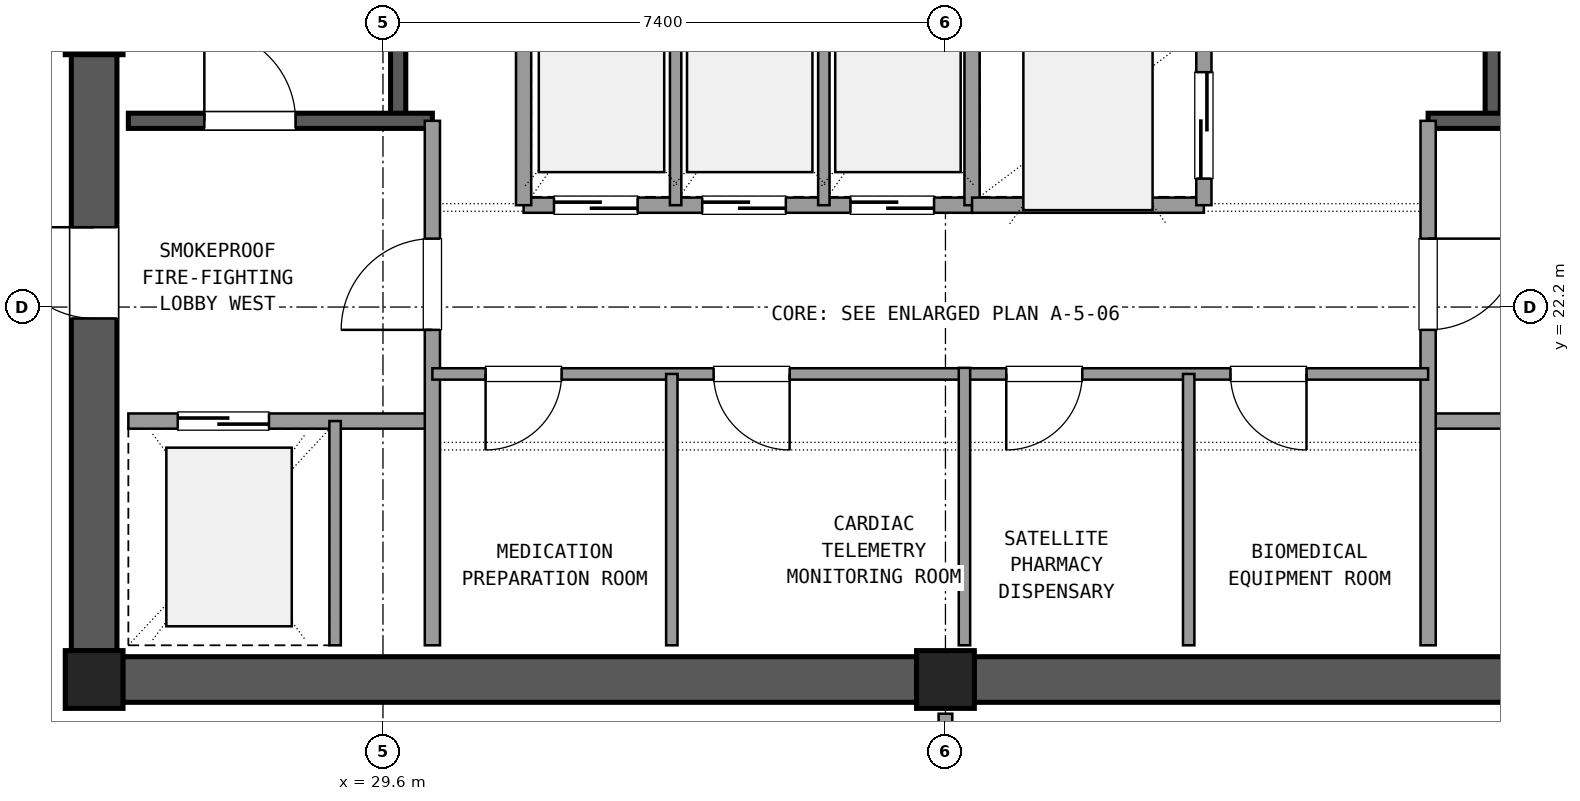
"""IFC4 building model, lengths in metres.
Left out: names, types, materials, properties, quantities, classifications, styles, units other than length and angle.
Written with IfcOpenShell. Run it as: python <this file> out.ifc"""

import sys

from ifc_helpers import new_model, si_unit, direction, frame, frame_2d, origin, origin_2d, place, context, subcontext, project, spatial, rectangle, extrude, element, fill, save


model = new_model("IFC4")
c1 = context("Model", 3, precision=1e-05, world=origin(), true_north=direction((0.0, 1.0)))
c2 = subcontext(c1, "Body", "Model", "MODEL_VIEW")
j1 = project(units=[si_unit("LENGTHUNIT", "METRE"), si_unit("PLANEANGLEUNIT", "RADIAN")], contexts=[c1])
p1 = place(None, origin())
s1 = spatial("IfcSite", under=j1, at=p1, CompositionType="ELEMENT")
p2 = place(p1, origin())
s2 = spatial("IfcBuilding", under=s1, at=p2, CompositionType="ELEMENT")
p3 = place(p2, frame((0.0, 0.0, 268.02)))
s3 = spatial("IfcBuildingStorey", under=s2, at=p3, CompositionType="ELEMENT", Elevation=268.02)
for number, where, z_axis, x_axis in (
    (1, (25.8, 17.3, 0.0), (0.0, 0.0, 1.0), (1.0, 0.0, 0.0)),
    (2, (37.0, 17.3, 0.0), (0.0, 0.0, 1.0), (1.0, 0.0, 0.0)),
    (3, (25.8, 25.9, 0.0), (0.0, 0.0, 1.0), (1.0, 0.0, 0.0)),
):
    element("IfcColumn", number, at=place(p3, frame(where, z_axis=z_axis, x_axis=x_axis)), inside=s3, PredefinedType="COLUMN", context=c2, shape_type="SweptSolid", body=[
        extrude(rectangle(XDim=0.76, YDim=0.76, at=origin_2d()), origin(), (0.0, 0.0, 1.0), 3.6),
    ])
for number, where, z_axis, x_axis in (
    (4, (26.175, 17.3, 0.0), (0.0, 0.0, 1.0), (1.0, 0.0, 0.0)),
    (5, (37.375, 17.3, 0.0), (0.0, 0.0, 1.0), (1.0, 0.0, 0.0)),
):
    element("IfcWall", number, at=place(p3, frame(where, z_axis=z_axis, x_axis=x_axis)), inside=s3, PredefinedType="SHEAR", context=c2, shape_type="SweptSolid", body=[
        extrude(rectangle(XDim=10.45, YDim=0.6, at=frame_2d((5.225, 0.0))), origin(), (0.0, 0.0, 1.0), 3.32),
    ])
p4 = place(p3, frame((25.8, 25.525, 0.0), z_axis=(0.0, 0.0, 1.0), x_axis=(0.0, -1.0, 0.0)))
e6 = element("IfcWall", 6, at=p4, inside=s3, PredefinedType="SHEAR", context=c2, shape_type="SweptSolid", body=[
    extrude(rectangle(XDim=7.85, YDim=0.6, at=frame_2d((3.925, 0.0))), origin(), (0.0, 0.0, 1.0), 3.32),
])
p5 = place(p4, frame((2.275, 0.0, 0.0)))
e7 = element("IfcOpeningElement", 7, at=p5, cuts=e6, PredefinedType="OPENING", context=c2, shape_type="SweptSolid", body=[
    extrude(rectangle(XDim=1.2, YDim=2.15, at=frame_2d((0.6, 1.075))), frame((0.0, 0.31, 0.0), z_axis=(0.0, -1.0, 0.0), x_axis=(1.0, 0.0, 0.0)), (0.0, 0.0, 1.0), 0.62),
])
p6 = place(p3, frame((29.8, 24.65, 0.0), z_axis=(0.0, 0.0, 1.0), x_axis=(0.0, 1.0, 0.0)))
e8 = element("IfcWall", 8, at=p6, inside=s3, PredefinedType="SHEAR", context=c2, shape_type="SweptSolid", body=[
    extrude(rectangle(XDim=9.4, YDim=0.2, at=frame_2d((4.7, 0.0))), origin(), (0.0, 0.0, 1.0), 3.32),
])
p7 = place(p3, frame((26.25, 24.65, 0.0), z_axis=(0.0, 0.0, 1.0), x_axis=(1.0, 0.0, 0.0)))
e9 = element("IfcWall", 9, at=p7, inside=s3, PredefinedType="SHEAR", context=c2, shape_type="SweptSolid", body=[
    extrude(rectangle(XDim=4.0, YDim=0.2, at=frame_2d((2.0, 0.0))), origin(), (0.0, 0.0, 1.0), 3.32),
])
p8 = place(p7, frame((1.0, 0.0, 0.0)))
e10 = element("IfcOpeningElement", 10, at=p8, cuts=e9, PredefinedType="OPENING", context=c2, shape_type="SweptSolid", body=[
    extrude(rectangle(XDim=1.2, YDim=2.15, at=frame_2d((0.6, 1.075))), frame((0.0, 0.11, 0.0), z_axis=(0.0, -1.0, 0.0), x_axis=(1.0, 0.0, 0.0)), (0.0, 0.0, 1.0), 0.22),
])
p9 = place(p3, frame((44.2, 24.65, 0.0), z_axis=(0.0, 0.0, 1.0), x_axis=(0.0, 1.0, 0.0)))
e11 = element("IfcWall", 11, at=p9, inside=s3, PredefinedType="SHEAR", context=c2, shape_type="SweptSolid", body=[
    extrude(rectangle(XDim=9.4, YDim=0.2, at=frame_2d((4.7, 0.0))), origin(), (0.0, 0.0, 1.0), 3.32),
])
p10 = place(p3, frame((43.35, 24.65, 0.0), z_axis=(0.0, 0.0, 1.0), x_axis=(1.0, 0.0, 0.0)))
e12 = element("IfcWall", 12, at=p10, inside=s3, PredefinedType="SHEAR", context=c2, shape_type="SweptSolid", body=[
    extrude(rectangle(XDim=4.4, YDim=0.2, at=frame_2d((2.2, 0.0))), origin(), (0.0, 0.0, 1.0), 3.32),
])
p11 = place(p10, frame((2.0, 0.0, 0.0)))
e13 = element("IfcOpeningElement", 13, at=p11, cuts=e12, PredefinedType="OPENING", context=c2, shape_type="SweptSolid", body=[
    extrude(rectangle(XDim=1.2, YDim=2.15, at=frame_2d((0.6, 1.075))), frame((0.0, 0.11, 0.0), z_axis=(0.0, -1.0, 0.0), x_axis=(1.0, 0.0, 0.0)), (0.0, 0.0, 1.0), 0.22),
])
p12 = place(p3, frame((26.25, 20.7, 0.0), z_axis=(0.0, 0.0, 1.0), x_axis=(1.0, 0.0, 0.0)))
e14 = element("IfcWall", 14, at=p12, inside=s3, PredefinedType="SOLIDWALL", context=c2, shape_type="SweptSolid", body=[
    extrude(rectangle(XDim=4.0, YDim=0.2, at=frame_2d((2.0, 0.0))), origin(), (0.0, 0.0, 1.0), 2.61),
])
p13 = place(p12, frame((0.65, 0.0, 0.0)))
e15 = element("IfcOpeningElement", 15, at=p13, cuts=e14, PredefinedType="OPENING", context=c2, shape_type="SweptSolid", body=[
    extrude(rectangle(XDim=1.2, YDim=2.15, at=frame_2d((0.6, 1.075))), frame((0.0, 0.11, 0.0), z_axis=(0.0, -1.0, 0.0), x_axis=(1.0, 0.0, 0.0)), (0.0, 0.0, 1.0), 0.22),
])
p14 = place(p3, frame((30.25, 17.75, 0.0), z_axis=(0.0, 0.0, 1.0), x_axis=(0.0, 1.0, 0.0)))
e16 = element("IfcWall", 16, at=p14, inside=s3, PredefinedType="SOLIDWALL", context=c2, shape_type="SweptSolid", body=[
    extrude(rectangle(XDim=6.9, YDim=0.2, at=frame_2d((3.45, 0.0))), origin(), (0.0, 0.0, 1.0), 2.61),
])
p15 = place(p14, frame((4.15, 0.0, 0.0)))
e17 = element("IfcOpeningElement", 17, at=p15, cuts=e16, PredefinedType="OPENING", context=c2, shape_type="SweptSolid", body=[
    extrude(rectangle(XDim=1.2, YDim=2.15, at=frame_2d((0.6, 1.075))), frame((0.0, 0.11, 0.0), z_axis=(0.0, -1.0, 0.0), x_axis=(1.0, 0.0, 0.0)), (0.0, 0.0, 1.0), 0.22),
])
p16 = place(p3, frame((28.97, 17.75, 0.0), z_axis=(0.0, 0.0, 1.0), x_axis=(0.0, 1.0, 0.0)))
e18 = element("IfcWall", 18, at=p16, inside=s3, PredefinedType="PARTITIONING", context=c2, shape_type="SweptSolid", body=[
    extrude(rectangle(XDim=2.95, YDim=0.15, at=frame_2d((1.475, 0.0))), origin(), (0.0, 0.0, 1.0), 2.61),
])
p17 = place(p3, frame((43.35, 20.7, 0.0), z_axis=(0.0, 0.0, 1.0), x_axis=(1.0, 0.0, 0.0)))
e19 = element("IfcWall", 19, at=p17, inside=s3, PredefinedType="SOLIDWALL", context=c2, shape_type="SweptSolid", body=[
    extrude(rectangle(XDim=4.4, YDim=0.2, at=frame_2d((2.2, 0.0))), origin(), (0.0, 0.0, 1.0), 2.61),
])
p18 = place(p17, frame((2.35, 0.0, 0.0)))
e20 = element("IfcOpeningElement", 20, at=p18, cuts=e19, PredefinedType="OPENING", context=c2, shape_type="SweptSolid", body=[
    extrude(rectangle(XDim=1.2, YDim=2.15, at=frame_2d((0.6, 1.075))), frame((0.0, 0.11, 0.0), z_axis=(0.0, -1.0, 0.0), x_axis=(1.0, 0.0, 0.0)), (0.0, 0.0, 1.0), 0.22),
])
p19 = place(p3, frame((43.35, 17.75, 0.0), z_axis=(0.0, 0.0, 1.0), x_axis=(0.0, 1.0, 0.0)))
e21 = element("IfcWall", 21, at=p19, inside=s3, PredefinedType="SOLIDWALL", context=c2, shape_type="SweptSolid", body=[
    extrude(rectangle(XDim=6.9, YDim=0.2, at=frame_2d((3.45, 0.0))), origin(), (0.0, 0.0, 1.0), 2.61),
])
p20 = place(p19, frame((4.15, 0.0, 0.0)))
e22 = element("IfcOpeningElement", 22, at=p20, cuts=e21, PredefinedType="OPENING", context=c2, shape_type="SweptSolid", body=[
    extrude(rectangle(XDim=1.2, YDim=2.15, at=frame_2d((0.6, 1.075))), frame((0.0, 0.11, 0.0), z_axis=(0.0, -1.0, 0.0), x_axis=(1.0, 0.0, 0.0)), (0.0, 0.0, 1.0), 0.22),
])
p21 = place(p3, frame((30.25, 21.32, 0.0), z_axis=(0.0, 0.0, 1.0), x_axis=(1.0, 0.0, 0.0)))
e23 = element("IfcWall", 23, at=p21, inside=s3, PredefinedType="PARTITIONING", context=c2, shape_type="SweptSolid", body=[
    extrude(rectangle(XDim=7.0, YDim=0.15, at=frame_2d((3.5, 0.0))), origin(), (0.0, 0.0, 1.0), 2.61),
])
p22 = place(p21, frame((0.7, 0.0, 0.0)))
e24 = element("IfcOpeningElement", 24, at=p22, cuts=e23, PredefinedType="OPENING", context=c2, shape_type="SweptSolid", body=[
    extrude(rectangle(XDim=1.0, YDim=2.15, at=frame_2d((0.5, 1.075))), frame((0.0, 0.085, 0.0), z_axis=(0.0, -1.0, 0.0), x_axis=(1.0, 0.0, 0.0)), (0.0, 0.0, 1.0), 0.17),
])
p23 = place(p21, frame((3.7, 0.0, 0.0)))
e25 = element("IfcOpeningElement", 25, at=p23, cuts=e23, PredefinedType="OPENING", context=c2, shape_type="SweptSolid", body=[
    extrude(rectangle(XDim=1.0, YDim=2.15, at=frame_2d((0.5, 1.075))), frame((0.0, 0.085, 0.0), z_axis=(0.0, -1.0, 0.0), x_axis=(1.0, 0.0, 0.0)), (0.0, 0.0, 1.0), 0.17),
])
p24 = place(p3, frame((33.4, 17.75, 0.0), z_axis=(0.0, 0.0, 1.0), x_axis=(0.0, 1.0, 0.0)))
e26 = element("IfcWall", 26, at=p24, inside=s3, PredefinedType="PARTITIONING", context=c2, shape_type="SweptSolid", body=[
    extrude(rectangle(XDim=3.57, YDim=0.15, at=frame_2d((1.785, 0.0))), origin(), (0.0, 0.0, 1.0), 2.61),
])
p25 = place(p3, frame((37.25, 21.32, 0.0), z_axis=(0.0, 0.0, 1.0), x_axis=(1.0, 0.0, 0.0)))
e27 = element("IfcWall", 27, at=p25, inside=s3, PredefinedType="PARTITIONING", context=c2, shape_type="SweptSolid", body=[
    extrude(rectangle(XDim=6.1, YDim=0.15, at=frame_2d((3.05, 0.0))), origin(), (0.0, 0.0, 1.0), 2.61),
])
p26 = place(p25, frame((0.55, 0.0, 0.0)))
e28 = element("IfcOpeningElement", 28, at=p26, cuts=e27, PredefinedType="OPENING", context=c2, shape_type="SweptSolid", body=[
    extrude(rectangle(XDim=1.0, YDim=2.15, at=frame_2d((0.5, 1.075))), frame((0.0, 0.085, 0.0), z_axis=(0.0, -1.0, 0.0), x_axis=(1.0, 0.0, 0.0)), (0.0, 0.0, 1.0), 0.17),
])
p27 = place(p25, frame((3.5, 0.0, 0.0)))
e29 = element("IfcOpeningElement", 29, at=p27, cuts=e27, PredefinedType="OPENING", context=c2, shape_type="SweptSolid", body=[
    extrude(rectangle(XDim=1.0, YDim=2.15, at=frame_2d((0.5, 1.075))), frame((0.0, 0.085, 0.0), z_axis=(0.0, -1.0, 0.0), x_axis=(1.0, 0.0, 0.0)), (0.0, 0.0, 1.0), 0.17),
])
p28 = place(p3, frame((40.2, 17.75, 0.0), z_axis=(0.0, 0.0, 1.0), x_axis=(0.0, 1.0, 0.0)))
e30 = element("IfcWall", 30, at=p28, inside=s3, PredefinedType="PARTITIONING", context=c2, shape_type="SweptSolid", body=[
    extrude(rectangle(XDim=3.57, YDim=0.15, at=frame_2d((1.785, 0.0))), origin(), (0.0, 0.0, 1.0), 2.61),
])
p29 = place(p3, frame((37.25, 17.75, 0.0), z_axis=(0.0, 0.0, 1.0), x_axis=(0.0, 1.0, 0.0)))
e31 = element("IfcWall", 31, at=p29, inside=s3, PredefinedType="PARTITIONING", context=c2, shape_type="SweptSolid", body=[
    extrude(rectangle(XDim=3.65, YDim=0.15, at=frame_2d((1.825, 0.0))), origin(), (0.0, 0.0, 1.0), 2.61),
])
p30 = place(p3, frame((31.45, 23.54, 0.0), z_axis=(0.0, 0.0, 1.0), x_axis=(1.0, 0.0, 0.0)))
e32 = element("IfcWall", 32, at=p30, inside=s3, PredefinedType="SOLIDWALL", context=c2, shape_type="SweptSolid", body=[
    extrude(rectangle(XDim=5.9, YDim=0.2, at=frame_2d((2.95, 0.0))), origin(), (0.0, 0.0, 1.0), 2.61),
])
p31 = place(p30, frame((0.4, 0.0, 0.0)))
e33 = element("IfcOpeningElement", 33, at=p31, cuts=e32, PredefinedType="OPENING", context=c2, shape_type="SweptSolid", body=[
    extrude(rectangle(XDim=1.1, YDim=2.15, at=frame_2d((0.55, 1.075))), frame((0.0, 0.11, 0.0), z_axis=(0.0, -1.0, 0.0), x_axis=(1.0, 0.0, 0.0)), (0.0, 0.0, 1.0), 0.22),
])
p32 = place(p30, frame((2.35, 0.0, 0.0)))
e34 = element("IfcOpeningElement", 34, at=p32, cuts=e32, PredefinedType="OPENING", context=c2, shape_type="SweptSolid", body=[
    extrude(rectangle(XDim=1.1, YDim=2.15, at=frame_2d((0.55, 1.075))), frame((0.0, 0.11, 0.0), z_axis=(0.0, -1.0, 0.0), x_axis=(1.0, 0.0, 0.0)), (0.0, 0.0, 1.0), 0.22),
])
p33 = place(p30, frame((4.3, 0.0, 0.0)))
e35 = element("IfcOpeningElement", 35, at=p33, cuts=e32, PredefinedType="OPENING", context=c2, shape_type="SweptSolid", body=[
    extrude(rectangle(XDim=1.1, YDim=2.15, at=frame_2d((0.55, 1.075))), frame((0.0, 0.11, 0.0), z_axis=(0.0, -1.0, 0.0), x_axis=(1.0, 0.0, 0.0)), (0.0, 0.0, 1.0), 0.22),
])
p34 = place(p3, frame((31.45, 23.54, 0.0), z_axis=(0.0, 0.0, 1.0), x_axis=(0.0, 1.0, 0.0)))
e36 = element("IfcWall", 36, at=p34, inside=s3, PredefinedType="SOLIDWALL", context=c2, shape_type="SweptSolid", body=[
    extrude(rectangle(XDim=2.81, YDim=0.2, at=frame_2d((1.405, 0.0))), origin(), (0.0, 0.0, 1.0), 2.61),
])
for number, where, z_axis, x_axis in (
    (37, (33.45, 23.54, 0.0), (0.0, 0.0, 1.0), (0.0, 1.0, 0.0)),
    (38, (35.4, 23.54, 0.0), (0.0, 0.0, 1.0), (0.0, 1.0, 0.0)),
):
    element("IfcWall", number, at=place(p3, frame(where, z_axis=z_axis, x_axis=x_axis)), inside=s3, PredefinedType="PARTITIONING", context=c2, shape_type="SweptSolid", body=[
        extrude(rectangle(XDim=2.81, YDim=0.15, at=frame_2d((1.405, 0.0))), origin(), (0.0, 0.0, 1.0), 2.61),
    ])
p35 = place(p3, frame((37.35, 23.54, 0.0), z_axis=(0.0, 0.0, 1.0), x_axis=(0.0, 1.0, 0.0)))
e39 = element("IfcWall", 39, at=p35, inside=s3, PredefinedType="SOLIDWALL", context=c2, shape_type="SweptSolid", body=[
    extrude(rectangle(XDim=6.82, YDim=0.2, at=frame_2d((3.41, 0.0))), origin(), (0.0, 0.0, 1.0), 2.61),
])
p36 = place(p3, frame((37.35, 23.54, 0.0), z_axis=(0.0, 0.0, 1.0), x_axis=(1.0, 0.0, 0.0)))
e40 = element("IfcWall", 40, at=p36, inside=s3, PredefinedType="SOLIDWALL", context=c2, shape_type="SweptSolid", body=[
    extrude(rectangle(XDim=3.05, YDim=0.2, at=frame_2d((1.525, 0.0))), origin(), (0.0, 0.0, 1.0), 2.61),
])
p37 = place(p3, frame((40.4, 23.54, 0.0), z_axis=(0.0, 0.0, 1.0), x_axis=(0.0, 1.0, 0.0)))
e41 = element("IfcWall", 41, at=p37, inside=s3, PredefinedType="SOLIDWALL", context=c2, shape_type="SweptSolid", body=[
    extrude(rectangle(XDim=6.82, YDim=0.2, at=frame_2d((3.41, 0.0))), origin(), (0.0, 0.0, 1.0), 2.61),
])
p38 = place(p37, frame((0.35, 0.0, 0.0)))
e42 = element("IfcOpeningElement", 42, at=p38, cuts=e41, PredefinedType="OPENING", context=c2, shape_type="SweptSolid", body=[
    extrude(rectangle(XDim=1.4, YDim=2.2, at=frame_2d((0.7, 1.1))), frame((0.0, 0.11, 0.0), z_axis=(0.0, -1.0, 0.0), x_axis=(1.0, 0.0, 0.0)), (0.0, 0.0, 1.0), 0.22),
])
p39 = place(p37, frame((2.65, 0.0, 0.0)))
e43 = element("IfcOpeningElement", 43, at=p39, cuts=e41, PredefinedType="OPENING", context=c2, shape_type="SweptSolid", body=[
    extrude(rectangle(XDim=1.4, YDim=2.2, at=frame_2d((0.7, 1.1))), frame((0.0, 0.11, 0.0), z_axis=(0.0, -1.0, 0.0), x_axis=(1.0, 0.0, 0.0)), (0.0, 0.0, 1.0), 0.22),
])
p40 = place(p37, frame((4.85, 0.0, 0.0)))
e44 = element("IfcOpeningElement", 44, at=p40, cuts=e41, PredefinedType="OPENING", context=c2, shape_type="SweptSolid", body=[
    extrude(rectangle(XDim=1.4, YDim=2.2, at=frame_2d((0.7, 1.1))), frame((0.0, 0.11, 0.0), z_axis=(0.0, -1.0, 0.0), x_axis=(1.0, 0.0, 0.0)), (0.0, 0.0, 1.0), 0.22),
])
p41 = place(p3, frame((37.0, 14.15, 0.0), z_axis=(0.0, 0.0, 1.0), x_axis=(0.0, 1.0, 0.0)))
e45 = element("IfcWall", 45, at=p41, inside=s3, PredefinedType="PARTITIONING", context=c2, shape_type="SweptSolid", body=[
    extrude(rectangle(XDim=2.7, YDim=0.18, at=frame_2d((1.35, 0.0))), origin(), (0.0, 0.0, 1.0), 2.61),
])
p42 = place(p41, frame((0.35, 0.0, 0.0)))
e46 = element("IfcOpeningElement", 46, at=p42, cuts=e45, PredefinedType="OPENING", context=c2, shape_type="SweptSolid", body=[
    extrude(rectangle(XDim=2.0, YDim=2.2, at=frame_2d((1.0, 1.1))), frame((0.0, 0.1, 0.0), z_axis=(0.0, -1.0, 0.0), x_axis=(1.0, 0.0, 0.0)), (0.0, 0.0, 1.0), 0.2),
])
p43 = place(p8, origin())
e47 = element("IfcDoor", 47, at=p43, inside=s3, OperationType="SINGLE_SWING_LEFT", PredefinedType="DOOR", context=c2, shape_type="SweptSolid", body=[
    extrude(rectangle(XDim=1.2, YDim=2.15, at=frame_2d((0.6, 1.075))), frame((0.0, 0.025, 0.0), z_axis=(0.0, -1.0, 0.0), x_axis=(1.0, 0.0, 0.0)), (0.0, 0.0, 1.0), 0.05),
])
fill(e10, e47)
p44 = place(p13, origin())
e48 = element("IfcDoor", 48, at=p44, inside=s3, OperationType="SLIDING_TO_LEFT", PredefinedType="DOOR", context=c2, shape_type="SweptSolid", body=[
    extrude(rectangle(XDim=1.2, YDim=2.15, at=frame_2d((0.6, 1.075))), frame((0.0, 0.025, 0.0), z_axis=(0.0, -1.0, 0.0), x_axis=(1.0, 0.0, 0.0)), (0.0, 0.0, 1.0), 0.05),
])
fill(e15, e48)
p45 = place(p15, origin())
e49 = element("IfcDoor", 49, at=p45, inside=s3, OperationType="SINGLE_SWING_LEFT", PredefinedType="DOOR", context=c2, shape_type="SweptSolid", body=[
    extrude(rectangle(XDim=1.2, YDim=2.15, at=frame_2d((0.6, 1.075))), frame((0.0, 0.025, 0.0), z_axis=(0.0, -1.0, 0.0), x_axis=(1.0, 0.0, 0.0)), (0.0, 0.0, 1.0), 0.05),
])
fill(e17, e49)
p46 = place(p20, frame((1.2, 0.0, 0.0), z_axis=(0.0, 0.0, 1.0), x_axis=(-1.0, 0.0, 0.0)))
e50 = element("IfcDoor", 50, at=p46, inside=s3, OperationType="SINGLE_SWING_RIGHT", PredefinedType="DOOR", context=c2, shape_type="SweptSolid", body=[
    extrude(rectangle(XDim=1.2, YDim=2.15, at=frame_2d((0.6, 1.075))), frame((0.0, 0.025, 0.0), z_axis=(0.0, -1.0, 0.0), x_axis=(1.0, 0.0, 0.0)), (0.0, 0.0, 1.0), 0.05),
])
fill(e22, e50)
p47 = place(p5, frame((1.2, 0.0, 0.0), z_axis=(0.0, 0.0, 1.0), x_axis=(-1.0, 0.0, 0.0)))
e51 = element("IfcDoor", 51, at=p47, inside=s3, OperationType="SINGLE_SWING_LEFT", PredefinedType="DOOR", context=c2, shape_type="SweptSolid", body=[
    extrude(rectangle(XDim=1.2, YDim=2.15, at=frame_2d((0.6, 1.075))), frame((0.0, 0.025, 0.0), z_axis=(0.0, -1.0, 0.0), x_axis=(1.0, 0.0, 0.0)), (0.0, 0.0, 1.0), 0.05),
])
fill(e7, e51)
p48 = place(p22, frame((1.0, 0.0, 0.0), z_axis=(0.0, 0.0, 1.0), x_axis=(-1.0, 0.0, 0.0)))
e52 = element("IfcDoor", 52, at=p48, inside=s3, OperationType="SINGLE_SWING_LEFT", PredefinedType="DOOR", context=c2, shape_type="SweptSolid", body=[
    extrude(rectangle(XDim=1.0, YDim=2.15, at=frame_2d((0.5, 1.075))), frame((0.0, 0.025, 0.0), z_axis=(0.0, -1.0, 0.0), x_axis=(1.0, 0.0, 0.0)), (0.0, 0.0, 1.0), 0.05),
])
fill(e24, e52)
p49 = place(p23, frame((1.0, 0.0, 0.0), z_axis=(0.0, 0.0, 1.0), x_axis=(-1.0, 0.0, 0.0)))
e53 = element("IfcDoor", 53, at=p49, inside=s3, OperationType="SINGLE_SWING_RIGHT", PredefinedType="DOOR", context=c2, shape_type="SweptSolid", body=[
    extrude(rectangle(XDim=1.0, YDim=2.15, at=frame_2d((0.5, 1.075))), frame((0.0, 0.025, 0.0), z_axis=(0.0, -1.0, 0.0), x_axis=(1.0, 0.0, 0.0)), (0.0, 0.0, 1.0), 0.05),
])
fill(e25, e53)
p50 = place(p26, frame((1.0, 0.0, 0.0), z_axis=(0.0, 0.0, 1.0), x_axis=(-1.0, 0.0, 0.0)))
e54 = element("IfcDoor", 54, at=p50, inside=s3, OperationType="SINGLE_SWING_LEFT", PredefinedType="DOOR", context=c2, shape_type="SweptSolid", body=[
    extrude(rectangle(XDim=1.0, YDim=2.15, at=frame_2d((0.5, 1.075))), frame((0.0, 0.025, 0.0), z_axis=(0.0, -1.0, 0.0), x_axis=(1.0, 0.0, 0.0)), (0.0, 0.0, 1.0), 0.05),
])
fill(e28, e54)
p51 = place(p27, frame((1.0, 0.0, 0.0), z_axis=(0.0, 0.0, 1.0), x_axis=(-1.0, 0.0, 0.0)))
e55 = element("IfcDoor", 55, at=p51, inside=s3, OperationType="SINGLE_SWING_RIGHT", PredefinedType="DOOR", context=c2, shape_type="SweptSolid", body=[
    extrude(rectangle(XDim=1.0, YDim=2.15, at=frame_2d((0.5, 1.075))), frame((0.0, 0.025, 0.0), z_axis=(0.0, -1.0, 0.0), x_axis=(1.0, 0.0, 0.0)), (0.0, 0.0, 1.0), 0.05),
])
fill(e29, e55)
p52 = place(p31, origin())
e56 = element("IfcDoor", 56, at=p52, inside=s3, OperationType="SLIDING_TO_RIGHT", PredefinedType="DOOR", context=c2, shape_type="SweptSolid", body=[
    extrude(rectangle(XDim=1.1, YDim=2.15, at=frame_2d((0.55, 1.075))), frame((0.0, 0.025, 0.0), z_axis=(0.0, -1.0, 0.0), x_axis=(1.0, 0.0, 0.0)), (0.0, 0.0, 1.0), 0.05),
])
fill(e33, e56)
p53 = place(p32, origin())
e57 = element("IfcDoor", 57, at=p53, inside=s3, OperationType="SLIDING_TO_RIGHT", PredefinedType="DOOR", context=c2, shape_type="SweptSolid", body=[
    extrude(rectangle(XDim=1.1, YDim=2.15, at=frame_2d((0.55, 1.075))), frame((0.0, 0.025, 0.0), z_axis=(0.0, -1.0, 0.0), x_axis=(1.0, 0.0, 0.0)), (0.0, 0.0, 1.0), 0.05),
])
fill(e34, e57)
p54 = place(p33, origin())
e58 = element("IfcDoor", 58, at=p54, inside=s3, OperationType="SLIDING_TO_RIGHT", PredefinedType="DOOR", context=c2, shape_type="SweptSolid", body=[
    extrude(rectangle(XDim=1.1, YDim=2.15, at=frame_2d((0.55, 1.075))), frame((0.0, 0.025, 0.0), z_axis=(0.0, -1.0, 0.0), x_axis=(1.0, 0.0, 0.0)), (0.0, 0.0, 1.0), 0.05),
])
fill(e35, e58)
p55 = place(p38, origin())
e59 = element("IfcDoor", 59, at=p55, inside=s3, OperationType="SLIDING_TO_LEFT", PredefinedType="DOOR", context=c2, shape_type="SweptSolid", body=[
    extrude(rectangle(XDim=1.4, YDim=2.2, at=frame_2d((0.7, 1.1))), frame((0.0, 0.025, 0.0), z_axis=(0.0, -1.0, 0.0), x_axis=(1.0, 0.0, 0.0)), (0.0, 0.0, 1.0), 0.05),
])
fill(e42, e59)
save(model, sys.argv[1])
